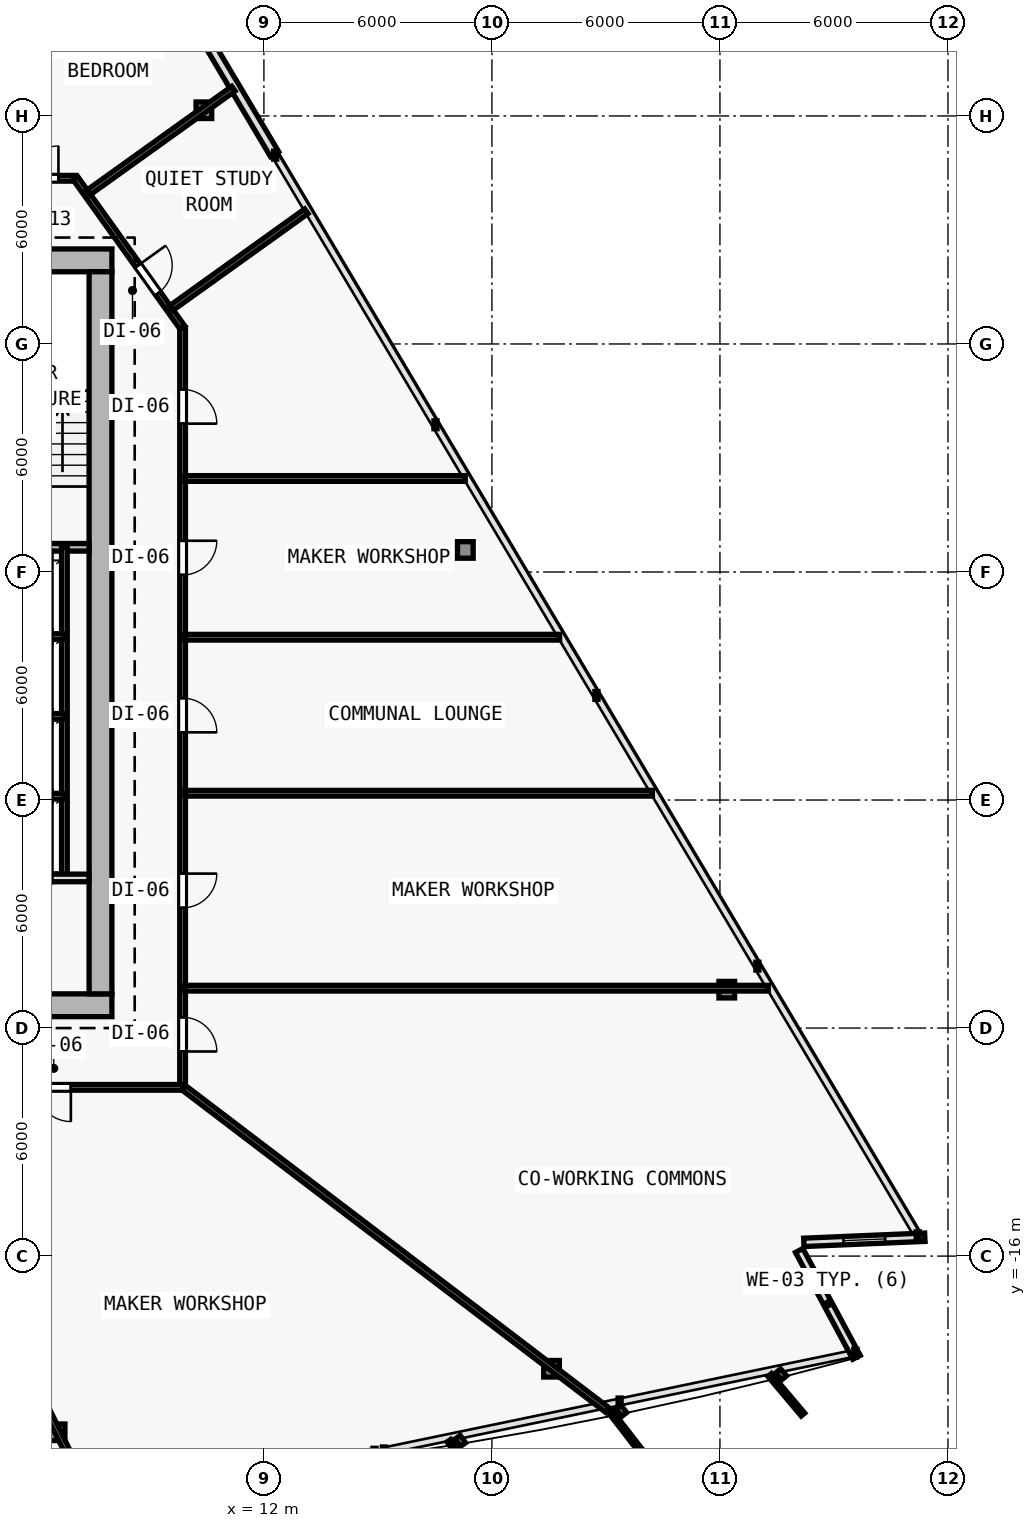
"""IFC4 building model, lengths in metres.
Left out: names, types, materials, properties, quantities, classifications, styles, units other than length and angle.
Written with IfcOpenShell. Run it as: python <this file> out.ifc"""

import sys

from ifc_helpers import new_model, si_unit, direction, frame, frame_2d, origin, origin_2d, place, context, subcontext, project, spatial, rectangle, i_section, extrude, element, fill, save


model = new_model("IFC4")
c1 = context("Model", 3, precision=1e-05, world=origin(), true_north=direction((0.0, 1.0)))
c2 = subcontext(c1, "Body", "Model", "MODEL_VIEW")
j1 = project(units=[si_unit("LENGTHUNIT", "METRE"), si_unit("PLANEANGLEUNIT", "RADIAN")], contexts=[c1])
p1 = place(None, origin())
s1 = spatial("IfcSite", under=j1, at=p1, CompositionType="ELEMENT")
p2 = place(p1, origin())
s2 = spatial("IfcBuilding", under=s1, at=p2, CompositionType="ELEMENT")
p3 = place(p2, frame((0.0, 0.0, 66.0)))
s3 = spatial("IfcBuildingStorey", under=s2, at=p3, CompositionType="ELEMENT", Elevation=66.0)
for number, where, z_axis, x_axis in (
    (1, (7.7, -9.4, 0.0), (0.0, 0.0, 1.0), (1.0, 0.0, 0.0)),
    (2, (7.7, 10.2, 0.0), (0.0, 0.0, 1.0), (1.0, 0.0, 0.0)),
    (3, (7.7, 0.4, 0.0), (0.0, 0.0, 1.0), (1.0, 0.0, 0.0)),
):
    element("IfcColumn", number, at=place(p3, frame(where, z_axis=z_axis, x_axis=x_axis)), inside=s3, PredefinedType="COLUMN", context=c2, shape_type="SweptSolid", body=[
        extrude(i_section(OverallWidth=0.416, OverallDepth=0.446, WebThickness=0.025, FlangeThickness=0.04, FilletRadius=0.015, at=origin_2d()), origin(), (0.0, 0.0, 1.0), 3.6),
    ])
p4 = place(p3, frame((6.558, -20.635, 0.006), z_axis=(-0.006934288159, 0.035283289748, 0.999353293441), x_axis=(-0.981229659911, -0.192842823335, 0.0)))
e4 = element("IfcColumn", 4, at=p4, inside=s3, PredefinedType="COLUMN", context=c2, shape_type="SweptSolid", body=[
    extrude(i_section(OverallWidth=0.412, OverallDepth=0.435, WebThickness=0.023, FlangeThickness=0.037, FilletRadius=0.015, at=origin_2d()), origin(), (0.0, 0.0, 1.0), 3.591),
])
p5 = place(p3, frame((19.568, -18.965, 0.006), z_axis=(-0.020596292833, 0.033511459955, 0.999226087917), x_axis=(-0.851954850327, -0.523615252838, 0.0)))
e5 = element("IfcColumn", 5, at=p5, inside=s3, PredefinedType="COLUMN", context=c2, shape_type="SweptSolid", body=[
    extrude(i_section(OverallWidth=0.412, OverallDepth=0.435, WebThickness=0.023, FlangeThickness=0.037, FilletRadius=0.015, at=origin_2d()), origin(), (0.0, 0.0, 1.0), 3.592),
])
p6 = place(p3, frame((24.18, -8.99, 0.006), z_axis=(-0.026107475214, 0.021552264695, 0.999426785525), x_axis=(-0.636621915226, -0.771176073964, 0.0)))
e6 = element("IfcColumn", 6, at=p6, inside=s3, PredefinedType="COLUMN", context=c2, shape_type="SweptSolid", body=[
    extrude(i_section(OverallWidth=0.412, OverallDepth=0.435, WebThickness=0.023, FlangeThickness=0.037, FilletRadius=0.015, at=origin_2d()), origin(), (0.0, 0.0, 1.0), 3.591),
])
p7 = place(p3, frame((17.301, 2.58, 0.006), z_axis=(-0.018907326549, 0.00952167524, 0.999775900241), x_axis=(-0.449781931574, -0.893138406984, 0.0)))
e7 = element("IfcColumn", 7, at=p7, inside=s3, PredefinedType="COLUMN", context=c2, shape_type="SweptSolid", body=[
    extrude(i_section(OverallWidth=0.412, OverallDepth=0.435, WebThickness=0.023, FlangeThickness=0.037, FilletRadius=0.015, at=origin_2d()), origin(), (0.0, 0.0, 1.0), 3.59),
])
p8 = place(p3, frame((10.421, 14.15, 0.006), z_axis=(-0.011699840322, -0.002584848443, 0.999928213571), x_axis=(0.215728093413, -0.976453475447, 0.0)))
e8 = element("IfcColumn", 8, at=p8, inside=s3, PredefinedType="COLUMN", context=c2, shape_type="SweptSolid", body=[
    extrude(i_section(OverallWidth=0.412, OverallDepth=0.435, WebThickness=0.023, FlangeThickness=0.037, FilletRadius=0.015, at=origin_2d()), origin(), (0.0, 0.0, 1.0), 3.589),
])
p9 = place(p3, frame((6.328, 23.006, 0.0), z_axis=(0.0, 0.0, 1.0), x_axis=(0.511075811474, -0.859535639125, 0.0)))
e9 = element("IfcWall", 9, at=p9, inside=s3, PredefinedType="SOLIDWALL", context=c2, shape_type="SweptSolid", body=[
    extrude(rectangle(XDim=11.646, YDim=0.25, at=frame_2d((5.823, 0.0))), origin(), (0.0, 0.0, 1.0), 3.35),
])
p10 = place(p9, frame((5.023, 0.0, 0.62)))
e10 = element("IfcOpeningElement", 10, at=p10, cuts=e9, PredefinedType="OPENING", context=c2, shape_type="SweptSolid", body=[
    extrude(rectangle(XDim=1.6, YDim=2.1, at=frame_2d((0.8, 1.05))), frame((0.0, 0.135, 0.0), z_axis=(0.0, -1.0, 0.0), x_axis=(1.0, 0.0, 0.0)), (0.0, 0.0, 1.0), 0.27),
])
p11 = place(p3, frame((26.086, -15.852, 0.0), z_axis=(0.0, 0.0, 1.0), x_axis=(0.472775670204, -0.881182821929, 0.0)))
e11 = element("IfcWall", 11, at=p11, inside=s3, PredefinedType="SOLIDWALL", context=c2, shape_type="SweptSolid", body=[
    extrude(rectangle(XDim=3.19, YDim=0.22, at=frame_2d((1.595, 0.0))), origin(), (0.0, 0.0, 1.0), 3.35),
])
p12 = place(p3, frame((29.391, -15.503, 0.0), z_axis=(0.0, 0.0, 1.0), x_axis=(-0.999095632957, -0.042519597906, 0.0)))
e12 = element("IfcWall", 12, at=p12, inside=s3, PredefinedType="SOLIDWALL", context=c2, shape_type="SweptSolid", body=[
    extrude(rectangle(XDim=3.187, YDim=0.22, at=frame_2d((1.593, 0.0))), origin(), (0.0, 0.0, 1.0), 3.35),
])
p13 = place(p12, frame((1.043, 0.0, 0.62)))
e13 = element("IfcOpeningElement", 13, at=p13, cuts=e12, PredefinedType="OPENING", context=c2, shape_type="SweptSolid", body=[
    extrude(rectangle(XDim=1.1, YDim=1.8, at=frame_2d((0.55, 0.9))), frame((0.0, 0.12, 0.0), z_axis=(0.0, -1.0, 0.0), x_axis=(1.0, 0.0, 0.0)), (0.0, 0.0, 1.0), 0.24),
])
p14 = place(p3, frame((-8.0, -9.4, 0.0), z_axis=(0.0, 0.0, 1.0), x_axis=(1.0, 0.0, 0.0)))
e14 = element("IfcWall", 14, at=p14, inside=s3, PredefinedType="SHEAR", context=c2, shape_type="SweptSolid", body=[
    extrude(rectangle(XDim=16.0, YDim=0.6, at=frame_2d((8.0, 0.0))), origin(), (0.0, 0.0, 1.0), 3.35),
])
p15 = place(p14, frame((9.65, 0.0, 0.0)))
e15 = element("IfcOpeningElement", 15, at=p15, cuts=e14, PredefinedType="OPENING", context=c2, shape_type="SweptSolid", body=[
    extrude(rectangle(XDim=1.5, YDim=2.2, at=frame_2d((0.75, 1.1))), frame((0.0, 0.31, 0.0), z_axis=(0.0, -1.0, 0.0), x_axis=(1.0, 0.0, 0.0)), (0.0, 0.0, 1.0), 0.62),
])
p16 = place(p3, frame((8.0, 10.2, 0.0), z_axis=(0.0, 0.0, 1.0), x_axis=(-1.0, 0.0, 0.0)))
e16 = element("IfcWall", 16, at=p16, inside=s3, PredefinedType="SHEAR", context=c2, shape_type="SweptSolid", body=[
    extrude(rectangle(XDim=16.0, YDim=0.6, at=frame_2d((8.0, 0.0))), origin(), (0.0, 0.0, 1.0), 3.35),
])
p17 = place(p16, frame((4.45, 0.0, 0.0)))
e17 = element("IfcOpeningElement", 17, at=p17, cuts=e16, PredefinedType="OPENING", context=c2, shape_type="SweptSolid", body=[
    extrude(rectangle(XDim=1.1, YDim=2.15, at=frame_2d((0.55, 1.075))), frame((0.0, 0.31, 0.0), z_axis=(0.0, -1.0, 0.0), x_axis=(1.0, 0.0, 0.0)), (0.0, 0.0, 1.0), 0.62),
])
p18 = place(p3, frame((7.7, 9.9, 0.0), z_axis=(0.0, 0.0, 1.0), x_axis=(0.0, -1.0, 0.0)))
e18 = element("IfcWall", 18, at=p18, inside=s3, PredefinedType="SHEAR", context=c2, shape_type="SweptSolid", body=[
    extrude(rectangle(XDim=19.0, YDim=0.6, at=frame_2d((9.5, 0.0))), origin(), (0.0, 0.0, 1.0), 3.35),
])
p19 = place(p3, frame((4.05, 2.65, 0.0), z_axis=(0.0, 0.0, 1.0), x_axis=(1.0, 0.0, 0.0)))
e19 = element("IfcWall", 19, at=p19, inside=s3, PredefinedType="SOLIDWALL", context=c2, shape_type="SweptSolid", body=[
    extrude(rectangle(XDim=3.35, YDim=0.2, at=frame_2d((1.675, 0.0))), origin(), (0.0, 0.0, 1.0), 3.35),
])
p20 = place(p3, frame((6.75, -6.05, 0.0), z_axis=(0.0, 0.0, 1.0), x_axis=(0.0, 1.0, 0.0)))
e20 = element("IfcWall", 20, at=p20, inside=s3, PredefinedType="PARTITIONING", context=c2, shape_type="SweptSolid", body=[
    extrude(rectangle(XDim=8.7, YDim=0.15, at=frame_2d((4.35, 0.0))), origin(), (0.0, 0.0, 1.0), 3.35),
])
for number, where, z_axis, x_axis in (
    (21, (4.15, -3.9, 0.0), (0.0, 0.0, 1.0), (1.0, 0.0, 0.0)),
    (22, (4.15, -1.8, 0.0), (0.0, 0.0, 1.0), (1.0, 0.0, 0.0)),
    (23, (4.15, 0.3, 0.0), (0.0, 0.0, 1.0), (1.0, 0.0, 0.0)),
):
    element("IfcWall", number, at=place(p3, frame(where, z_axis=z_axis, x_axis=x_axis)), inside=s3, PredefinedType="PARTITIONING", context=c2, shape_type="SweptSolid", body=[
        extrude(rectangle(XDim=2.6, YDim=0.15, at=frame_2d((1.3, 0.0))), origin(), (0.0, 0.0, 1.0), 3.35),
    ])
p21 = place(p3, frame((4.15, -6.05, 0.0), z_axis=(0.0, 0.0, 1.0), x_axis=(1.0, 0.0, 0.0)))
e24 = element("IfcWall", 24, at=p21, inside=s3, PredefinedType="SOLIDWALL", context=c2, shape_type="SweptSolid", body=[
    extrude(rectangle(XDim=3.245, YDim=0.2, at=frame_2d((1.623, 0.0))), origin(), (0.0, 0.0, 1.0), 3.35),
])
p22 = place(p3, frame((-7.041, 12.36, 0.0), z_axis=(0.0, 0.0, 1.0), x_axis=(1.0, 0.0, 0.0)))
e25 = element("IfcWall", 25, at=p22, inside=s3, PredefinedType="PARTITIONING", context=c2, shape_type="SweptSolid", body=[
    extrude(rectangle(XDim=14.082, YDim=0.15, at=frame_2d((7.041, 0.0))), origin(), (0.0, 0.0, 1.0), 3.35),
])
p23 = place(p22, frame((12.784, 0.0, 0.0)))
e26 = element("IfcOpeningElement", 26, at=p23, cuts=e25, PredefinedType="OPENING", context=c2, shape_type="SweptSolid", body=[
    extrude(rectangle(XDim=0.85, YDim=2.1, at=frame_2d((0.425, 1.05))), frame((0.0, 0.085, 0.0), z_axis=(0.0, -1.0, 0.0), x_axis=(1.0, 0.0, 0.0)), (0.0, 0.0, 1.0), 0.17),
])
p24 = place(p22, frame((10.858, 0.0, 0.0)))
e27 = element("IfcOpeningElement", 27, at=p24, cuts=e25, PredefinedType="OPENING", context=c2, shape_type="SweptSolid", body=[
    extrude(rectangle(XDim=0.9, YDim=2.1, at=frame_2d((0.45, 1.05))), frame((0.0, 0.085, 0.0), z_axis=(0.0, -1.0, 0.0), x_axis=(1.0, 0.0, 0.0)), (0.0, 0.0, 1.0), 0.17),
])
p25 = place(p22, frame((8.904, 0.0, 0.0)))
e28 = element("IfcOpeningElement", 28, at=p25, cuts=e25, PredefinedType="OPENING", context=c2, shape_type="SweptSolid", body=[
    extrude(rectangle(XDim=0.85, YDim=2.1, at=frame_2d((0.425, 1.05))), frame((0.0, 0.085, 0.0), z_axis=(0.0, -1.0, 0.0), x_axis=(1.0, 0.0, 0.0)), (0.0, 0.0, 1.0), 0.17),
])
p26 = place(p22, frame((6.212, 0.0, 0.0)))
e29 = element("IfcOpeningElement", 29, at=p26, cuts=e25, PredefinedType="OPENING", context=c2, shape_type="SweptSolid", body=[
    extrude(rectangle(XDim=0.9, YDim=2.1, at=frame_2d((0.45, 1.05))), frame((0.0, 0.085, 0.0), z_axis=(0.0, -1.0, 0.0), x_axis=(1.0, 0.0, 0.0)), (0.0, 0.0, 1.0), 0.17),
])
p27 = place(p22, frame((3.763, 0.0, 0.0)))
e30 = element("IfcOpeningElement", 30, at=p27, cuts=e25, PredefinedType="OPENING", context=c2, shape_type="SweptSolid", body=[
    extrude(rectangle(XDim=0.85, YDim=2.1, at=frame_2d((0.425, 1.05))), frame((0.0, 0.085, 0.0), z_axis=(0.0, -1.0, 0.0), x_axis=(1.0, 0.0, 0.0)), (0.0, 0.0, 1.0), 0.17),
])
p28 = place(p22, frame((2.429, 0.0, 0.0)))
e31 = element("IfcOpeningElement", 31, at=p28, cuts=e25, PredefinedType="OPENING", context=c2, shape_type="SweptSolid", body=[
    extrude(rectangle(XDim=0.85, YDim=2.1, at=frame_2d((0.425, 1.05))), frame((0.0, 0.085, 0.0), z_axis=(0.0, -1.0, 0.0), x_axis=(1.0, 0.0, 0.0)), (0.0, 0.0, 1.0), 0.17),
])
p29 = place(p22, frame((0.74, 0.0, 0.0)))
e32 = element("IfcOpeningElement", 32, at=p29, cuts=e25, PredefinedType="OPENING", context=c2, shape_type="SweptSolid", body=[
    extrude(rectangle(XDim=0.9, YDim=2.1, at=frame_2d((0.45, 1.05))), frame((0.0, 0.085, 0.0), z_axis=(0.0, -1.0, 0.0), x_axis=(1.0, 0.0, 0.0)), (0.0, 0.0, 1.0), 0.17),
])
p30 = place(p3, frame((7.041, 12.36, 0.0), z_axis=(0.0, 0.0, 1.0), x_axis=(0.582449511476, -0.812866881218, 0.0)))
e33 = element("IfcWall", 33, at=p30, inside=s3, PredefinedType="PARTITIONING", context=c2, shape_type="SweptSolid", body=[
    extrude(rectangle(XDim=4.84, YDim=0.15, at=frame_2d((2.42, 0.0))), origin(), (0.0, 0.0, 1.0), 2.725),
])
p31 = place(p30, frame((2.825, 0.0, 0.0)))
e34 = element("IfcOpeningElement", 34, at=p31, cuts=e33, PredefinedType="OPENING", context=c2, shape_type="SweptSolid", body=[
    extrude(rectangle(XDim=0.9, YDim=2.1, at=frame_2d((0.45, 1.05))), frame((0.0, 0.085, 0.0), z_axis=(0.0, -1.0, 0.0), x_axis=(1.0, 0.0, 0.0)), (0.0, 0.0, 1.0), 0.17),
])
p32 = place(p3, frame((9.86, 8.426, 0.0), z_axis=(0.0, 0.0, 1.0), x_axis=(0.0, -1.0, 0.0)))
e35 = element("IfcWall", 35, at=p32, inside=s3, PredefinedType="PARTITIONING", context=c2, shape_type="SweptSolid", body=[
    extrude(rectangle(XDim=19.986, YDim=0.15, at=frame_2d((9.993, 0.0))), origin(), (0.0, 0.0, 1.0), 2.609),
])
p33 = place(p32, frame((18.142, 0.0, 0.0)))
e36 = element("IfcOpeningElement", 36, at=p33, cuts=e35, PredefinedType="OPENING", context=c2, shape_type="SweptSolid", body=[
    extrude(rectangle(XDim=0.9, YDim=2.1, at=frame_2d((0.45, 1.05))), frame((0.0, 0.085, 0.0), z_axis=(0.0, -1.0, 0.0), x_axis=(1.0, 0.0, 0.0)), (0.0, 0.0, 1.0), 0.17),
])
p34 = place(p32, frame((14.362, 0.0, 0.0)))
e37 = element("IfcOpeningElement", 37, at=p34, cuts=e35, PredefinedType="OPENING", context=c2, shape_type="SweptSolid", body=[
    extrude(rectangle(XDim=0.9, YDim=2.1, at=frame_2d((0.45, 1.05))), frame((0.0, 0.085, 0.0), z_axis=(0.0, -1.0, 0.0), x_axis=(1.0, 0.0, 0.0)), (0.0, 0.0, 1.0), 0.17),
])
p35 = place(p32, frame((9.744, 0.0, 0.0)))
e38 = element("IfcOpeningElement", 38, at=p35, cuts=e35, PredefinedType="OPENING", context=c2, shape_type="SweptSolid", body=[
    extrude(rectangle(XDim=0.9, YDim=2.1, at=frame_2d((0.45, 1.05))), frame((0.0, 0.085, 0.0), z_axis=(0.0, -1.0, 0.0), x_axis=(1.0, 0.0, 0.0)), (0.0, 0.0, 1.0), 0.17),
])
p36 = place(p32, frame((5.604, 0.0, 0.0)))
e39 = element("IfcOpeningElement", 39, at=p36, cuts=e35, PredefinedType="OPENING", context=c2, shape_type="SweptSolid", body=[
    extrude(rectangle(XDim=0.9, YDim=2.1, at=frame_2d((0.45, 1.05))), frame((0.0, 0.085, 0.0), z_axis=(0.0, -1.0, 0.0), x_axis=(1.0, 0.0, 0.0)), (0.0, 0.0, 1.0), 0.17),
])
p37 = place(p32, frame((1.622, 0.0, 0.0)))
e40 = element("IfcOpeningElement", 40, at=p37, cuts=e35, PredefinedType="OPENING", context=c2, shape_type="SweptSolid", body=[
    extrude(rectangle(XDim=0.9, YDim=2.1, at=frame_2d((0.45, 1.05))), frame((0.0, 0.085, 0.0), z_axis=(0.0, -1.0, 0.0), x_axis=(1.0, 0.0, 0.0)), (0.0, 0.0, 1.0), 0.17),
])
p38 = place(p3, frame((9.86, -11.56, 0.0), z_axis=(0.0, 0.0, 1.0), x_axis=(-1.0, 0.0, 0.0)))
e41 = element("IfcWall", 41, at=p38, inside=s3, PredefinedType="PARTITIONING", context=c2, shape_type="SweptSolid", body=[
    extrude(rectangle(XDim=6.78, YDim=0.15, at=frame_2d((3.39, 0.0))), origin(), (0.0, 0.0, 1.0), 3.35),
])
p39 = place(p38, frame((2.94, 0.0, 0.0)))
e42 = element("IfcOpeningElement", 42, at=p39, cuts=e41, PredefinedType="OPENING", context=c2, shape_type="SweptSolid", body=[
    extrude(rectangle(XDim=0.9, YDim=2.1, at=frame_2d((0.45, 1.05))), frame((0.0, 0.085, 0.0), z_axis=(0.0, -1.0, 0.0), x_axis=(1.0, 0.0, 0.0)), (0.0, 0.0, 1.0), 0.17),
])
p40 = place(p3, frame((3.066, -13.573, 0.0), z_axis=(0.0, 0.0, 1.0), x_axis=(0.445213283885, -0.89542455397, 0.0)))
e43 = element("IfcWall", 43, at=p40, inside=s3, PredefinedType="PARTITIONING", context=c2, shape_type="SweptSolid", body=[
    extrude(rectangle(XDim=9.33, YDim=0.15, at=frame_2d((4.665, 0.0))), origin(), (0.0, 0.0, 1.0), 2.725),
])
p41 = place(p3, frame((9.888, -11.569, 0.0), z_axis=(0.0, 0.0, 1.0), x_axis=(0.795860269097, -0.605480331698, 0.0)))
e44 = element("IfcWall", 44, at=p41, inside=s3, PredefinedType="PARTITIONING", context=c2, shape_type="SweptSolid", body=[
    extrude(rectangle(XDim=14.013, YDim=0.15, at=frame_2d((7.006, 0.0))), origin(), (0.0, 0.0, 1.0), 2.725),
])
p42 = place(p3, frame((9.92, -8.951, 0.0), z_axis=(0.0, 0.0, 1.0), x_axis=(1.0, 0.0, 0.0)))
e45 = element("IfcWall", 45, at=p42, inside=s3, PredefinedType="PARTITIONING", context=c2, shape_type="SweptSolid", body=[
    extrude(rectangle(XDim=15.352, YDim=0.15, at=frame_2d((7.676, 0.0))), origin(), (0.0, 0.0, 1.0), 2.609),
])
p43 = place(p3, frame((7.384, 11.984, 0.0), z_axis=(0.0, 0.0, 1.0), x_axis=(0.812878301618, 0.582433572829, 0.0)))
e46 = element("IfcWall", 46, at=p43, inside=s3, PredefinedType="PARTITIONING", context=c2, shape_type="SweptSolid", body=[
    extrude(rectangle(XDim=4.692, YDim=0.15, at=frame_2d((2.346, 0.0))), origin(), (0.0, 0.0, 1.0), 2.725),
])
p44 = place(p3, frame((9.92, 0.284, 0.0), z_axis=(0.0, 0.0, 1.0), x_axis=(1.0, 0.0, 0.0)))
e47 = element("IfcWall", 47, at=p44, inside=s3, PredefinedType="PARTITIONING", context=c2, shape_type="SweptSolid", body=[
    extrude(rectangle(XDim=9.861, YDim=0.15, at=frame_2d((4.93, 0.0))), origin(), (0.0, 0.0, 1.0), 2.735),
])
p45 = place(p3, frame((9.92, -3.822, 0.0), z_axis=(0.0, 0.0, 1.0), x_axis=(1.0, 0.0, 0.0)))
e48 = element("IfcWall", 48, at=p45, inside=s3, PredefinedType="PARTITIONING", context=c2, shape_type="SweptSolid", body=[
    extrude(rectangle(XDim=12.302, YDim=0.15, at=frame_2d((6.151, 0.0))), origin(), (0.0, 0.0, 1.0), 2.735),
])
p46 = place(p3, frame((9.92, 4.46, 0.0), z_axis=(0.0, 0.0, 1.0), x_axis=(1.0, 0.0, 0.0)))
e49 = element("IfcWall", 49, at=p46, inside=s3, PredefinedType="PARTITIONING", context=c2, shape_type="SweptSolid", body=[
    extrude(rectangle(XDim=7.377, YDim=0.15, at=frame_2d((3.689, 0.0))), origin(), (0.0, 0.0, 1.0), 2.735),
])
p47 = place(p3, frame((9.562, 8.945, 0.0), z_axis=(0.0, 0.0, 1.0), x_axis=(0.812868674116, 0.582447009299, 0.0)))
e50 = element("IfcWall", 50, at=p47, inside=s3, PredefinedType="PARTITIONING", context=c2, shape_type="SweptSolid", body=[
    extrude(rectangle(XDim=4.373, YDim=0.15, at=frame_2d((2.187, 0.0))), origin(), (0.0, 0.0, 1.0), 2.735),
])
p48 = place(p13, origin())
e51 = element("IfcWindow", 51, at=p48, inside=s3, PartitioningType="SINGLE_PANEL", PredefinedType="WINDOW", context=c2, shape_type="SweptSolid", body=[
    extrude(rectangle(XDim=1.1, YDim=1.8, at=frame_2d((0.55, 0.9))), frame((0.0, 0.03, 0.0), z_axis=(0.0, -1.0, 0.0), x_axis=(1.0, 0.0, 0.0)), (0.0, 0.0, 1.0), 0.06),
])
fill(e13, e51)
p49 = place(p39, origin())
e52 = element("IfcDoor", 52, at=p49, inside=s3, OperationType="SINGLE_SWING_LEFT", PredefinedType="DOOR", context=c2, shape_type="SweptSolid", body=[
    extrude(rectangle(XDim=0.9, YDim=2.1, at=frame_2d((0.45, 1.05))), frame((0.0, 0.025, 0.0), z_axis=(0.0, -1.0, 0.0), x_axis=(1.0, 0.0, 0.0)), (0.0, 0.0, 1.0), 0.05),
])
fill(e42, e52)
p50 = place(p33, origin())
e53 = element("IfcDoor", 53, at=p50, inside=s3, OperationType="SINGLE_SWING_RIGHT", PredefinedType="DOOR", context=c2, shape_type="SweptSolid", body=[
    extrude(rectangle(XDim=0.9, YDim=2.1, at=frame_2d((0.45, 1.05))), frame((0.0, 0.025, 0.0), z_axis=(0.0, -1.0, 0.0), x_axis=(1.0, 0.0, 0.0)), (0.0, 0.0, 1.0), 0.05),
])
fill(e36, e53)
p51 = place(p34, origin())
e54 = element("IfcDoor", 54, at=p51, inside=s3, OperationType="SINGLE_SWING_LEFT", PredefinedType="DOOR", context=c2, shape_type="SweptSolid", body=[
    extrude(rectangle(XDim=0.9, YDim=2.1, at=frame_2d((0.45, 1.05))), frame((0.0, 0.025, 0.0), z_axis=(0.0, -1.0, 0.0), x_axis=(1.0, 0.0, 0.0)), (0.0, 0.0, 1.0), 0.05),
])
fill(e37, e54)
p52 = place(p35, origin())
e55 = element("IfcDoor", 55, at=p52, inside=s3, OperationType="SINGLE_SWING_RIGHT", PredefinedType="DOOR", context=c2, shape_type="SweptSolid", body=[
    extrude(rectangle(XDim=0.9, YDim=2.1, at=frame_2d((0.45, 1.05))), frame((0.0, 0.025, 0.0), z_axis=(0.0, -1.0, 0.0), x_axis=(1.0, 0.0, 0.0)), (0.0, 0.0, 1.0), 0.05),
])
fill(e38, e55)
p53 = place(p36, origin())
e56 = element("IfcDoor", 56, at=p53, inside=s3, OperationType="SINGLE_SWING_LEFT", PredefinedType="DOOR", context=c2, shape_type="SweptSolid", body=[
    extrude(rectangle(XDim=0.9, YDim=2.1, at=frame_2d((0.45, 1.05))), frame((0.0, 0.025, 0.0), z_axis=(0.0, -1.0, 0.0), x_axis=(1.0, 0.0, 0.0)), (0.0, 0.0, 1.0), 0.05),
])
fill(e39, e56)
p54 = place(p37, origin())
e57 = element("IfcDoor", 57, at=p54, inside=s3, OperationType="SINGLE_SWING_RIGHT", PredefinedType="DOOR", context=c2, shape_type="SweptSolid", body=[
    extrude(rectangle(XDim=0.9, YDim=2.1, at=frame_2d((0.45, 1.05))), frame((0.0, 0.025, 0.0), z_axis=(0.0, -1.0, 0.0), x_axis=(1.0, 0.0, 0.0)), (0.0, 0.0, 1.0), 0.05),
])
fill(e40, e57)
p55 = place(p31, origin())
e58 = element("IfcDoor", 58, at=p55, inside=s3, OperationType="SINGLE_SWING_LEFT", PredefinedType="DOOR", context=c2, shape_type="SweptSolid", body=[
    extrude(rectangle(XDim=0.9, YDim=2.1, at=frame_2d((0.45, 1.05))), frame((0.0, 0.025, 0.0), z_axis=(0.0, -1.0, 0.0), x_axis=(1.0, 0.0, 0.0)), (0.0, 0.0, 1.0), 0.05),
])
fill(e34, e58)
p56 = place(p23, origin())
e59 = element("IfcDoor", 59, at=p56, inside=s3, OperationType="SINGLE_SWING_RIGHT", PredefinedType="DOOR", context=c2, shape_type="SweptSolid", body=[
    extrude(rectangle(XDim=0.85, YDim=2.1, at=frame_2d((0.425, 1.05))), frame((0.0, 0.025, 0.0), z_axis=(0.0, -1.0, 0.0), x_axis=(1.0, 0.0, 0.0)), (0.0, 0.0, 1.0), 0.05),
])
fill(e26, e59)
save(model, sys.argv[1])
